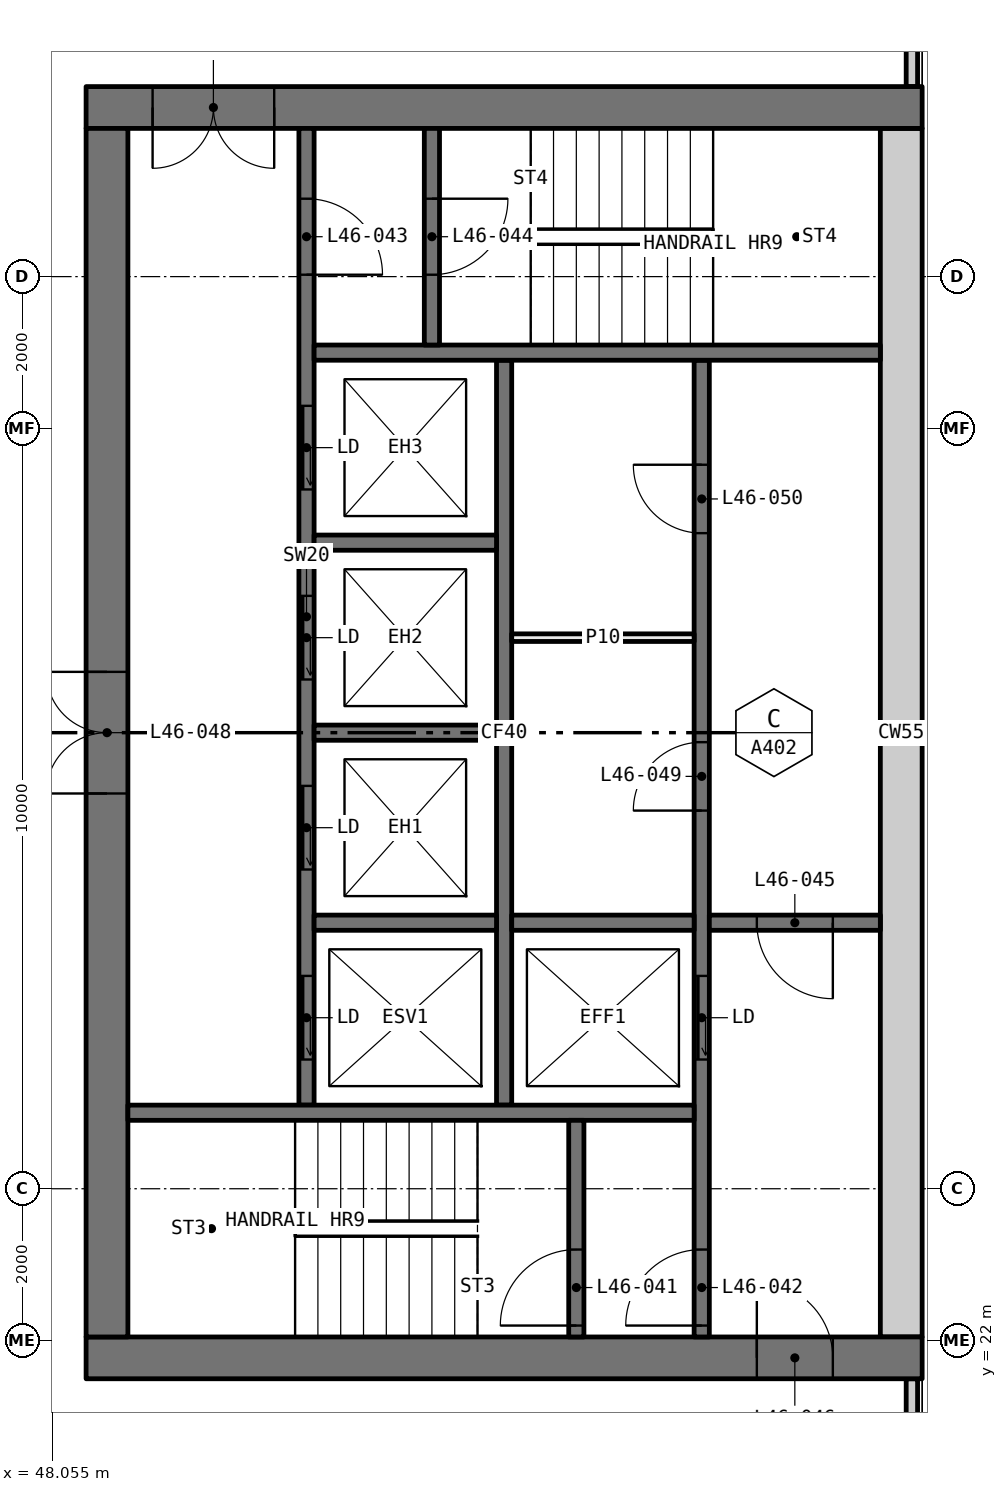
"""IFC4 building model, lengths in metres.
Left out: names, types, materials, properties, quantities, classifications, styles, units other than length and angle.
Written with IfcOpenShell. Run it as: python <this file> out.ifc"""

import sys

from ifc_helpers import new_model, si_unit, direction, frame, frame_2d, origin, place, context, subcontext, project, spatial, rectangle, extrude, element, fill, save


model = new_model("IFC4")
c1 = context("Model", 3, precision=1e-05, world=origin(), true_north=direction((0.0, 1.0)))
c2 = subcontext(c1, "Body", "Model", "MODEL_VIEW")
j1 = project(units=[si_unit("LENGTHUNIT", "METRE"), si_unit("PLANEANGLEUNIT", "RADIAN")], contexts=[c1])
p1 = place(None, origin())
s1 = spatial("IfcSite", under=j1, at=p1, CompositionType="ELEMENT")
p2 = place(p1, origin())
s2 = spatial("IfcBuilding", under=s1, at=p2, CompositionType="ELEMENT")
p3 = place(p2, frame((0.0, 0.0, 175.5)))
s3 = spatial("IfcBuildingStorey", under=s2, at=p3, CompositionType="ELEMENT", Elevation=175.5)
for number, where, z_axis, x_axis in (
    (1, (59.365, 18.71, 0.0), (0.0, 0.0, 1.0), (0.0, 1.0, 0.0)),
    (2, (59.365, 38.5, 0.0), (0.0, 0.0, 1.0), (0.0, 1.0, 0.0)),
):
    element("IfcWall", number, at=place(p3, frame(where, z_axis=z_axis, x_axis=x_axis)), inside=s3, PredefinedType="ELEMENTEDWALL", context=c2, shape_type="SweptSolid", body=[
        extrude(rectangle(XDim=2.79, YDim=0.15, at=frame_2d((1.395, 0.0))), origin(), (0.0, 0.0, 1.0), 3.05),
    ])
p4 = place(p3, frame((59.5, 21.775, 0.0), z_axis=(0.0, 0.0, 1.0), x_axis=(-1.0, 0.0, 0.0)))
e3 = element("IfcWall", 3, at=p4, inside=s3, PredefinedType="SHEAR", context=c2, shape_type="SweptSolid", body=[
    extrude(rectangle(XDim=11.0, YDim=0.55, at=frame_2d((5.5, 0.0))), origin(), (0.0, 0.0, 1.0), 3.05),
])
p5 = place(p4, frame((1.175, 0.0, 0.0)))
e4 = element("IfcOpeningElement", 4, at=p5, cuts=e3, PredefinedType="OPENING", context=c2, shape_type="SweptSolid", body=[
    extrude(rectangle(XDim=1.0, YDim=2.1, at=frame_2d((0.5, 1.05))), frame((0.0, 0.285, 0.0), z_axis=(0.0, -1.0, 0.0), x_axis=(1.0, 0.0, 0.0)), (0.0, 0.0, 1.0), 0.57),
])
p6 = place(p3, frame((59.5, 38.225, 0.0), z_axis=(0.0, 0.0, 1.0), x_axis=(-1.0, 0.0, 0.0)))
e5 = element("IfcWall", 5, at=p6, inside=s3, PredefinedType="SHEAR", context=c2, shape_type="SweptSolid", body=[
    extrude(rectangle(XDim=11.0, YDim=0.55, at=frame_2d((5.5, 0.0))), origin(), (0.0, 0.0, 1.0), 3.05),
])
p7 = place(p6, frame((8.525, 0.0, 0.0)))
e6 = element("IfcOpeningElement", 6, at=p7, cuts=e5, PredefinedType="OPENING", context=c2, shape_type="SweptSolid", body=[
    extrude(rectangle(XDim=1.6, YDim=2.1, at=frame_2d((0.8, 1.05))), frame((0.0, 0.285, 0.0), z_axis=(0.0, -1.0, 0.0), x_axis=(1.0, 0.0, 0.0)), (0.0, 0.0, 1.0), 0.57),
])
p8 = place(p3, frame((59.225, 22.05, 0.0), z_axis=(0.0, 0.0, 1.0), x_axis=(0.0, 1.0, 0.0)))
e7 = element("IfcWall", 7, at=p8, inside=s3, PredefinedType="SHEAR", context=c2, shape_type="SweptSolid", body=[
    extrude(rectangle(XDim=15.9, YDim=0.55, at=frame_2d((7.95, 0.0))), origin(), (0.0, 0.0, 1.0), 3.05),
])
p9 = place(p3, frame((48.775, 22.05, 0.0), z_axis=(0.0, 0.0, 1.0), x_axis=(0.0, 1.0, 0.0)))
e8 = element("IfcWall", 8, at=p9, inside=s3, PredefinedType="SHEAR", context=c2, shape_type="SweptSolid", body=[
    extrude(rectangle(XDim=15.9, YDim=0.55, at=frame_2d((7.95, 0.0))), origin(), (0.0, 0.0, 1.0), 3.05),
])
p10 = place(p9, frame((7.15, 0.0, 0.0)))
e9 = element("IfcOpeningElement", 9, at=p10, cuts=e8, PredefinedType="OPENING", context=c2, shape_type="SweptSolid", body=[
    extrude(rectangle(XDim=1.6, YDim=2.1, at=frame_2d((0.8, 1.05))), frame((0.0, 0.285, 0.0), z_axis=(0.0, -1.0, 0.0), x_axis=(1.0, 0.0, 0.0)), (0.0, 0.0, 1.0), 0.57),
])
p11 = place(p3, frame((56.6, 22.05, 0.0), z_axis=(0.0, 0.0, 1.0), x_axis=(0.0, 1.0, 0.0)))
e10 = element("IfcWall", 10, at=p11, inside=s3, PredefinedType="SOLIDWALL", context=c2, shape_type="SweptSolid", body=[
    extrude(rectangle(XDim=12.85, YDim=0.2, at=frame_2d((6.425, 0.0))), origin(), (0.0, 0.0, 1.0), 3.05),
])
p12 = place(p11, frame((3.65, 0.0, 0.0)))
e11 = element("IfcOpeningElement", 11, at=p12, cuts=e10, PredefinedType="OPENING", context=c2, shape_type="SweptSolid", body=[
    extrude(rectangle(XDim=1.1, YDim=2.1, at=frame_2d((0.55, 1.05))), frame((0.0, 0.11, 0.0), z_axis=(0.0, -1.0, 0.0), x_axis=(1.0, 0.0, 0.0)), (0.0, 0.0, 1.0), 0.22),
])
p13 = place(p11, frame((0.15, 0.0, 0.0)))
e12 = element("IfcOpeningElement", 12, at=p13, cuts=e10, PredefinedType="OPENING", context=c2, shape_type="SweptSolid", body=[
    extrude(rectangle(XDim=1.0, YDim=2.1, at=frame_2d((0.5, 1.05))), frame((0.0, 0.11, 0.0), z_axis=(0.0, -1.0, 0.0), x_axis=(1.0, 0.0, 0.0)), (0.0, 0.0, 1.0), 0.22),
])
p14 = place(p11, frame((6.925, 0.0, 0.0)))
e13 = element("IfcOpeningElement", 13, at=p14, cuts=e10, PredefinedType="OPENING", context=c2, shape_type="SweptSolid", body=[
    extrude(rectangle(XDim=0.9, YDim=2.1, at=frame_2d((0.45, 1.05))), frame((0.0, 0.11, 0.0), z_axis=(0.0, -1.0, 0.0), x_axis=(1.0, 0.0, 0.0)), (0.0, 0.0, 1.0), 0.22),
])
p15 = place(p11, frame((10.575, 0.0, 0.0)))
e14 = element("IfcOpeningElement", 14, at=p15, cuts=e10, PredefinedType="OPENING", context=c2, shape_type="SweptSolid", body=[
    extrude(rectangle(XDim=0.9, YDim=2.1, at=frame_2d((0.45, 1.05))), frame((0.0, 0.11, 0.0), z_axis=(0.0, -1.0, 0.0), x_axis=(1.0, 0.0, 0.0)), (0.0, 0.0, 1.0), 0.22),
])
p16 = place(p3, frame((51.4, 25.1, 0.0), z_axis=(0.0, 0.0, 1.0), x_axis=(0.0, 1.0, 0.0)))
e15 = element("IfcWall", 15, at=p16, inside=s3, PredefinedType="SOLIDWALL", context=c2, shape_type="SweptSolid", body=[
    extrude(rectangle(XDim=12.85, YDim=0.2, at=frame_2d((6.425, 0.0))), origin(), (0.0, 0.0, 1.0), 3.05),
])
p17 = place(p16, frame((0.6, 0.0, 0.0)))
e16 = element("IfcOpeningElement", 16, at=p17, cuts=e15, PredefinedType="OPENING", context=c2, shape_type="SweptSolid", body=[
    extrude(rectangle(XDim=1.1, YDim=2.1, at=frame_2d((0.55, 1.05))), frame((0.0, 0.11, 0.0), z_axis=(0.0, -1.0, 0.0), x_axis=(1.0, 0.0, 0.0)), (0.0, 0.0, 1.0), 0.22),
])
p18 = place(p16, frame((3.1, 0.0, 0.0)))
e17 = element("IfcOpeningElement", 17, at=p18, cuts=e15, PredefinedType="OPENING", context=c2, shape_type="SweptSolid", body=[
    extrude(rectangle(XDim=1.1, YDim=2.1, at=frame_2d((0.55, 1.05))), frame((0.0, 0.11, 0.0), z_axis=(0.0, -1.0, 0.0), x_axis=(1.0, 0.0, 0.0)), (0.0, 0.0, 1.0), 0.22),
])
p19 = place(p16, frame((5.6, 0.0, 0.0)))
e18 = element("IfcOpeningElement", 18, at=p19, cuts=e15, PredefinedType="OPENING", context=c2, shape_type="SweptSolid", body=[
    extrude(rectangle(XDim=1.1, YDim=2.1, at=frame_2d((0.55, 1.05))), frame((0.0, 0.11, 0.0), z_axis=(0.0, -1.0, 0.0), x_axis=(1.0, 0.0, 0.0)), (0.0, 0.0, 1.0), 0.22),
])
p20 = place(p16, frame((8.1, 0.0, 0.0)))
e19 = element("IfcOpeningElement", 19, at=p20, cuts=e15, PredefinedType="OPENING", context=c2, shape_type="SweptSolid", body=[
    extrude(rectangle(XDim=1.1, YDim=2.1, at=frame_2d((0.55, 1.05))), frame((0.0, 0.11, 0.0), z_axis=(0.0, -1.0, 0.0), x_axis=(1.0, 0.0, 0.0)), (0.0, 0.0, 1.0), 0.22),
])
p21 = place(p16, frame((10.925, 0.0, 0.0)))
e20 = element("IfcOpeningElement", 20, at=p21, cuts=e15, PredefinedType="OPENING", context=c2, shape_type="SweptSolid", body=[
    extrude(rectangle(XDim=1.0, YDim=2.1, at=frame_2d((0.5, 1.05))), frame((0.0, 0.11, 0.0), z_axis=(0.0, -1.0, 0.0), x_axis=(1.0, 0.0, 0.0)), (0.0, 0.0, 1.0), 0.22),
])
p22 = place(p3, frame((54.0, 25.1, 0.0), z_axis=(0.0, 0.0, 1.0), x_axis=(0.0, 1.0, 0.0)))
e21 = element("IfcWall", 21, at=p22, inside=s3, PredefinedType="SOLIDWALL", context=c2, shape_type="SweptSolid", body=[
    extrude(rectangle(XDim=9.8, YDim=0.2, at=frame_2d((4.9, 0.0))), origin(), (0.0, 0.0, 1.0), 3.05),
])
for number, where, z_axis, x_axis in (
    (22, (56.5, 25.0, 0.0), (0.0, 0.0, 1.0), (-1.0, 0.0, 0.0)),
    (23, (58.95, 35.0, 0.0), (0.0, 0.0, 1.0), (-1.0, 0.0, 0.0)),
):
    element("IfcWall", number, at=place(p3, frame(where, z_axis=z_axis, x_axis=x_axis)), inside=s3, PredefinedType="SOLIDWALL", context=c2, shape_type="SweptSolid", body=[
        extrude(rectangle(XDim=7.45, YDim=0.2, at=frame_2d((3.725, 0.0))), origin(), (0.0, 0.0, 1.0), 3.05),
    ])
p23 = place(p3, frame((58.95, 27.5, 0.0), z_axis=(0.0, 0.0, 1.0), x_axis=(-1.0, 0.0, 0.0)))
e24 = element("IfcWall", 24, at=p23, inside=s3, PredefinedType="SOLIDWALL", context=c2, shape_type="SweptSolid", body=[
    extrude(rectangle(XDim=2.25, YDim=0.2, at=frame_2d((1.125, 0.0))), origin(), (0.0, 0.0, 1.0), 3.05),
])
p24 = place(p23, frame((0.625, 0.0, 0.0)))
e25 = element("IfcOpeningElement", 25, at=p24, cuts=e24, PredefinedType="OPENING", context=c2, shape_type="SweptSolid", body=[
    extrude(rectangle(XDim=1.0, YDim=2.1, at=frame_2d((0.5, 1.05))), frame((0.0, 0.11, 0.0), z_axis=(0.0, -1.0, 0.0), x_axis=(1.0, 0.0, 0.0)), (0.0, 0.0, 1.0), 0.22),
])
p25 = place(p3, frame((54.95, 22.05, 0.0), z_axis=(0.0, 0.0, 1.0), x_axis=(0.0, 1.0, 0.0)))
e26 = element("IfcWall", 26, at=p25, inside=s3, PredefinedType="SOLIDWALL", context=c2, shape_type="SweptSolid", body=[
    extrude(rectangle(XDim=2.85, YDim=0.2, at=frame_2d((1.425, 0.0))), origin(), (0.0, 0.0, 1.0), 3.05),
])
p26 = place(p25, frame((0.15, 0.0, 0.0)))
e27 = element("IfcOpeningElement", 27, at=p26, cuts=e26, PredefinedType="OPENING", context=c2, shape_type="SweptSolid", body=[
    extrude(rectangle(XDim=1.0, YDim=2.1, at=frame_2d((0.5, 1.05))), frame((0.0, 0.11, 0.0), z_axis=(0.0, -1.0, 0.0), x_axis=(1.0, 0.0, 0.0)), (0.0, 0.0, 1.0), 0.22),
])
p27 = place(p3, frame((53.05, 35.1, 0.0), z_axis=(0.0, 0.0, 1.0), x_axis=(0.0, 1.0, 0.0)))
e28 = element("IfcWall", 28, at=p27, inside=s3, PredefinedType="SOLIDWALL", context=c2, shape_type="SweptSolid", body=[
    extrude(rectangle(XDim=2.85, YDim=0.2, at=frame_2d((1.425, 0.0))), origin(), (0.0, 0.0, 1.0), 3.05),
])
p28 = place(p27, frame((0.925, 0.0, 0.0)))
e29 = element("IfcOpeningElement", 29, at=p28, cuts=e28, PredefinedType="OPENING", context=c2, shape_type="SweptSolid", body=[
    extrude(rectangle(XDim=1.0, YDim=2.1, at=frame_2d((0.5, 1.05))), frame((0.0, 0.11, 0.0), z_axis=(0.0, -1.0, 0.0), x_axis=(1.0, 0.0, 0.0)), (0.0, 0.0, 1.0), 0.22),
])
for number, where, z_axis, x_axis in (
    (30, (56.5, 27.5, 0.0), (0.0, 0.0, 1.0), (-1.0, 0.0, 0.0)),
    (31, (53.9, 27.5, 0.0), (0.0, 0.0, 1.0), (-1.0, 0.0, 0.0)),
    (32, (53.9, 30.0, 0.0), (0.0, 0.0, 1.0), (-1.0, 0.0, 0.0)),
    (33, (53.9, 32.5, 0.0), (0.0, 0.0, 1.0), (-1.0, 0.0, 0.0)),
):
    element("IfcWall", number, at=place(p3, frame(where, z_axis=z_axis, x_axis=x_axis)), inside=s3, PredefinedType="SOLIDWALL", context=c2, shape_type="SweptSolid", body=[
        extrude(rectangle(XDim=2.4, YDim=0.2, at=frame_2d((1.2, 0.0))), origin(), (0.0, 0.0, 1.0), 3.05),
    ])
p29 = place(p3, frame((56.5, 31.25, 0.0), z_axis=(0.0, 0.0, 1.0), x_axis=(-1.0, 0.0, 0.0)))
e34 = element("IfcWall", 34, at=p29, inside=s3, PredefinedType="PARTITIONING", context=c2, shape_type="SweptSolid", body=[
    extrude(rectangle(XDim=2.4, YDim=0.1, at=frame_2d((1.2, 0.0))), origin(), (0.0, 0.0, 1.0), 3.05),
])
p30 = place(p17, origin())
e35 = element("IfcDoor", 35, at=p30, inside=s3, OperationType="SLIDING_TO_LEFT", PredefinedType="DOOR", context=c2, shape_type="SweptSolid", body=[
    extrude(rectangle(XDim=1.1, YDim=2.1, at=frame_2d((0.55, 1.05))), frame((0.0, 0.025, 0.0), z_axis=(0.0, -1.0, 0.0), x_axis=(1.0, 0.0, 0.0)), (0.0, 0.0, 1.0), 0.05),
])
fill(e16, e35)
p31 = place(p18, origin())
e36 = element("IfcDoor", 36, at=p31, inside=s3, OperationType="SLIDING_TO_LEFT", PredefinedType="DOOR", context=c2, shape_type="SweptSolid", body=[
    extrude(rectangle(XDim=1.1, YDim=2.1, at=frame_2d((0.55, 1.05))), frame((0.0, 0.025, 0.0), z_axis=(0.0, -1.0, 0.0), x_axis=(1.0, 0.0, 0.0)), (0.0, 0.0, 1.0), 0.05),
])
fill(e17, e36)
p32 = place(p19, origin())
e37 = element("IfcDoor", 37, at=p32, inside=s3, OperationType="SLIDING_TO_LEFT", PredefinedType="DOOR", context=c2, shape_type="SweptSolid", body=[
    extrude(rectangle(XDim=1.1, YDim=2.1, at=frame_2d((0.55, 1.05))), frame((0.0, 0.025, 0.0), z_axis=(0.0, -1.0, 0.0), x_axis=(1.0, 0.0, 0.0)), (0.0, 0.0, 1.0), 0.05),
])
fill(e18, e37)
p33 = place(p20, origin())
e38 = element("IfcDoor", 38, at=p33, inside=s3, OperationType="SLIDING_TO_LEFT", PredefinedType="DOOR", context=c2, shape_type="SweptSolid", body=[
    extrude(rectangle(XDim=1.1, YDim=2.1, at=frame_2d((0.55, 1.05))), frame((0.0, 0.025, 0.0), z_axis=(0.0, -1.0, 0.0), x_axis=(1.0, 0.0, 0.0)), (0.0, 0.0, 1.0), 0.05),
])
fill(e19, e38)
p34 = place(p12, origin())
e39 = element("IfcDoor", 39, at=p34, inside=s3, OperationType="SLIDING_TO_LEFT", PredefinedType="DOOR", context=c2, shape_type="SweptSolid", body=[
    extrude(rectangle(XDim=1.1, YDim=2.1, at=frame_2d((0.55, 1.05))), frame((0.0, 0.025, 0.0), z_axis=(0.0, -1.0, 0.0), x_axis=(1.0, 0.0, 0.0)), (0.0, 0.0, 1.0), 0.05),
])
fill(e11, e39)
p35 = place(p26, origin())
e40 = element("IfcDoor", 40, at=p35, inside=s3, OperationType="SINGLE_SWING_RIGHT", PredefinedType="DOOR", context=c2, shape_type="SweptSolid", body=[
    extrude(rectangle(XDim=1.0, YDim=2.1, at=frame_2d((0.5, 1.05))), frame((0.0, 0.025, 0.0), z_axis=(0.0, -1.0, 0.0), x_axis=(1.0, 0.0, 0.0)), (0.0, 0.0, 1.0), 0.05),
])
fill(e27, e40)
p36 = place(p13, origin())
e41 = element("IfcDoor", 41, at=p36, inside=s3, OperationType="SINGLE_SWING_RIGHT", PredefinedType="DOOR", context=c2, shape_type="SweptSolid", body=[
    extrude(rectangle(XDim=1.0, YDim=2.1, at=frame_2d((0.5, 1.05))), frame((0.0, 0.025, 0.0), z_axis=(0.0, -1.0, 0.0), x_axis=(1.0, 0.0, 0.0)), (0.0, 0.0, 1.0), 0.05),
])
fill(e12, e41)
p37 = place(p21, frame((1.0, 0.0, 0.0), x_axis=(-1.0, 0.0, 0.0)))
e42 = element("IfcDoor", 42, at=p37, inside=s3, OperationType="SINGLE_SWING_LEFT", PredefinedType="DOOR", context=c2, shape_type="SweptSolid", body=[
    extrude(rectangle(XDim=1.0, YDim=2.1, at=frame_2d((0.5, 1.05))), frame((0.0, 0.025, 0.0), z_axis=(0.0, -1.0, 0.0), x_axis=(1.0, 0.0, 0.0)), (0.0, 0.0, 1.0), 0.05),
])
fill(e20, e42)
p38 = place(p28, frame((1.0, 0.0, 0.0), x_axis=(-1.0, 0.0, 0.0)))
e43 = element("IfcDoor", 43, at=p38, inside=s3, OperationType="SINGLE_SWING_RIGHT", PredefinedType="DOOR", context=c2, shape_type="SweptSolid", body=[
    extrude(rectangle(XDim=1.0, YDim=2.1, at=frame_2d((0.5, 1.05))), frame((0.0, 0.025, 0.0), z_axis=(0.0, -1.0, 0.0), x_axis=(1.0, 0.0, 0.0)), (0.0, 0.0, 1.0), 0.05),
])
fill(e29, e43)
p39 = place(p24, origin())
e44 = element("IfcDoor", 44, at=p39, inside=s3, OperationType="SINGLE_SWING_RIGHT", PredefinedType="DOOR", context=c2, shape_type="SweptSolid", body=[
    extrude(rectangle(XDim=1.0, YDim=2.1, at=frame_2d((0.5, 1.05))), frame((0.0, 0.025, 0.0), z_axis=(0.0, -1.0, 0.0), x_axis=(1.0, 0.0, 0.0)), (0.0, 0.0, 1.0), 0.05),
])
fill(e25, e44)
p40 = place(p5, frame((1.0, 0.0, 0.0), x_axis=(-1.0, 0.0, 0.0)))
e45 = element("IfcDoor", 45, at=p40, inside=s3, OperationType="SINGLE_SWING_RIGHT", PredefinedType="DOOR", context=c2, shape_type="SweptSolid", body=[
    extrude(rectangle(XDim=1.0, YDim=2.1, at=frame_2d((0.5, 1.05))), frame((0.0, 0.025, 0.0), z_axis=(0.0, -1.0, 0.0), x_axis=(1.0, 0.0, 0.0)), (0.0, 0.0, 1.0), 0.05),
])
fill(e4, e45)
p41 = place(p7, origin())
e46 = element("IfcDoor", 46, at=p41, inside=s3, OperationType="DOUBLE_DOOR_SINGLE_SWING", PredefinedType="DOOR", context=c2, shape_type="SweptSolid", body=[
    extrude(rectangle(XDim=1.6, YDim=2.1, at=frame_2d((0.8, 1.05))), frame((0.0, 0.025, 0.0), z_axis=(0.0, -1.0, 0.0), x_axis=(1.0, 0.0, 0.0)), (0.0, 0.0, 1.0), 0.05),
])
fill(e6, e46)
p42 = place(p10, origin())
e47 = element("IfcDoor", 47, at=p42, inside=s3, OperationType="DOUBLE_DOOR_SINGLE_SWING", PredefinedType="DOOR", context=c2, shape_type="SweptSolid", body=[
    extrude(rectangle(XDim=1.6, YDim=2.1, at=frame_2d((0.8, 1.05))), frame((0.0, 0.025, 0.0), z_axis=(0.0, -1.0, 0.0), x_axis=(1.0, 0.0, 0.0)), (0.0, 0.0, 1.0), 0.05),
])
fill(e9, e47)
p43 = place(p14, origin())
e48 = element("IfcDoor", 48, at=p43, inside=s3, OperationType="SINGLE_SWING_RIGHT", PredefinedType="DOOR", context=c2, shape_type="SweptSolid", body=[
    extrude(rectangle(XDim=0.9, YDim=2.1, at=frame_2d((0.45, 1.05))), frame((0.0, 0.025, 0.0), z_axis=(0.0, -1.0, 0.0), x_axis=(1.0, 0.0, 0.0)), (0.0, 0.0, 1.0), 0.05),
])
fill(e13, e48)
p44 = place(p15, origin())
e49 = element("IfcDoor", 49, at=p44, inside=s3, OperationType="SINGLE_SWING_LEFT", PredefinedType="DOOR", context=c2, shape_type="SweptSolid", body=[
    extrude(rectangle(XDim=0.9, YDim=2.1, at=frame_2d((0.45, 1.05))), frame((0.0, 0.025, 0.0), z_axis=(0.0, -1.0, 0.0), x_axis=(1.0, 0.0, 0.0)), (0.0, 0.0, 1.0), 0.05),
])
fill(e14, e49)
save(model, sys.argv[1])
